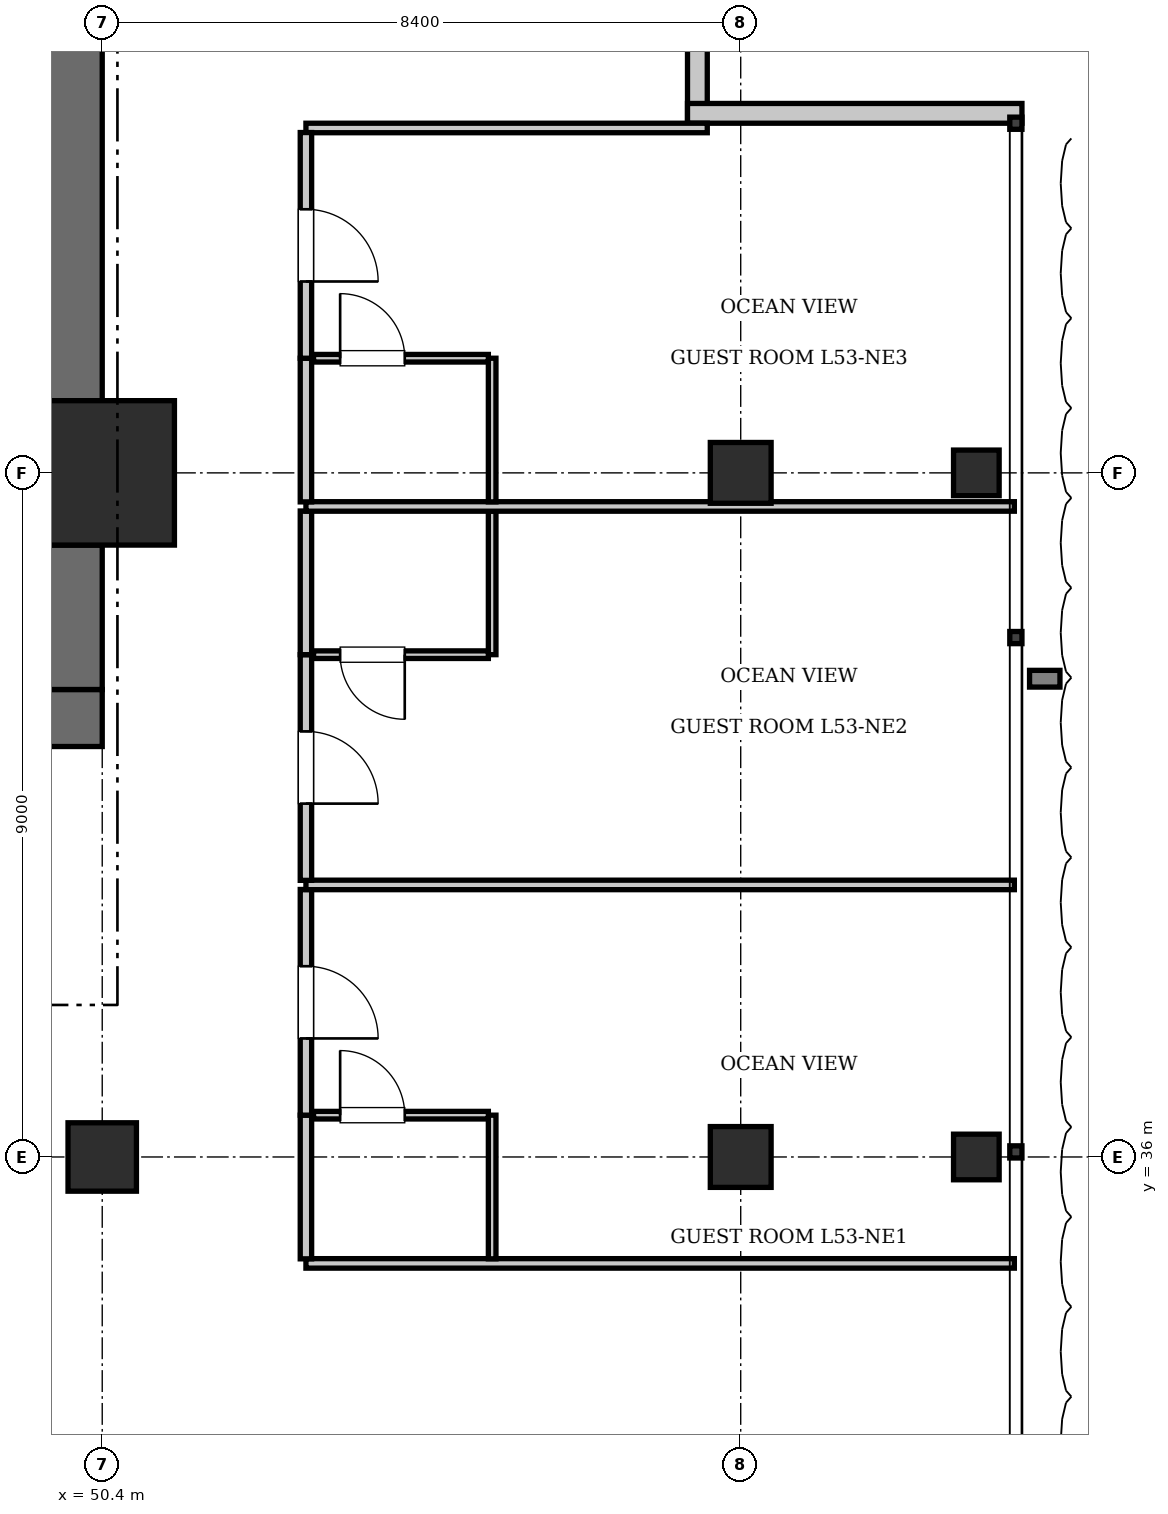
"""IFC4 building model, lengths in metres.
Left out: names, types, materials, properties, quantities, classifications, styles, units other than length and angle.
Written with IfcOpenShell. Run it as: python <this file> out.ifc"""

import sys

from ifc_helpers import new_model, si_unit, direction, frame, frame_2d, origin, origin_2d, place, context, subcontext, project, spatial, rectangle, i_section, extrude, element, fill, save


model = new_model("IFC4")
c1 = context("Model", 3, precision=1e-05, world=origin(), true_north=direction((0.0, 1.0)))
c2 = subcontext(c1, "Body", "Model", "MODEL_VIEW")
j1 = project(units=[si_unit("LENGTHUNIT", "METRE"), si_unit("PLANEANGLEUNIT", "RADIAN")], contexts=[c1])
p1 = place(None, origin())
s1 = spatial("IfcSite", under=j1, at=p1, CompositionType="ELEMENT")
p2 = place(p1, origin())
s2 = spatial("IfcBuilding", under=s1, at=p2, CompositionType="ELEMENT")
p3 = place(p2, frame((0.0, 0.0, 215.95)))
s3 = spatial("IfcBuildingStorey", under=s2, at=p3, CompositionType="ELEMENT", Elevation=215.95)
p4 = place(p3, frame((50.4, 45.0, 0.0), z_axis=(0.0, 0.0, 1.0), x_axis=(1.0, 0.0, 0.0)))
e1 = element("IfcColumn", 1, at=p4, inside=s3, PredefinedType="COLUMN", context=c2, shape_type="SweptSolid", body=[
    extrude(rectangle(XDim=1.9, YDim=1.9, at=origin_2d()), origin(), (0.0, 0.0, 1.0), 3.85),
])
p5 = place(p3, frame((43.6, 41.775, 0.0), z_axis=(0.0, 0.0, 1.0), x_axis=(1.0, 0.0, 0.0)))
e2 = element("IfcWall", 2, at=p5, inside=s3, PredefinedType="SHEAR", context=c2, shape_type="SweptSolid", body=[
    extrude(rectangle(XDim=6.8, YDim=0.75, at=frame_2d((3.4, 0.0))), origin(), (0.0, 0.0, 1.0), 3.85),
])
p6 = place(p5, frame((3.9, 0.0, 0.0)))
e3 = element("IfcOpeningElement", 3, at=p6, cuts=e2, PredefinedType="OPENING", context=c2, shape_type="SweptSolid", body=[
    extrude(rectangle(XDim=1.15, YDim=2.15, at=frame_2d((0.575, 1.075))), frame((0.0, 0.385, 0.0), z_axis=(0.0, -1.0, 0.0), x_axis=(1.0, 0.0, 0.0)), (0.0, 0.0, 1.0), 0.77),
])
p7 = place(p5, frame((0.55, 0.0, 0.0)))
e4 = element("IfcOpeningElement", 4, at=p7, cuts=e2, PredefinedType="OPENING", context=c2, shape_type="SweptSolid", body=[
    extrude(rectangle(XDim=1.1, YDim=2.2, at=frame_2d((0.55, 1.1))), frame((0.0, 0.385, 0.0), z_axis=(0.0, -1.0, 0.0), x_axis=(1.0, 0.0, 0.0)), (0.0, 0.0, 1.0), 0.77),
])
p8 = place(p3, frame((50.025, 42.15, 0.0), z_axis=(0.0, 0.0, 1.0), x_axis=(0.0, 1.0, 0.0)))
e5 = element("IfcWall", 5, at=p8, inside=s3, PredefinedType="SHEAR", context=c2, shape_type="SweptSolid", body=[
    extrude(rectangle(XDim=1.9, YDim=0.75, at=frame_2d((0.95, 0.0))), origin(), (0.0, 0.0, 1.0), 3.85),
])
p9 = place(p3, frame((50.025, 45.95, 0.0), z_axis=(0.0, 0.0, 1.0), x_axis=(0.0, 1.0, 0.0)))
e6 = element("IfcWall", 6, at=p9, inside=s3, PredefinedType="SHEAR", context=c2, shape_type="SweptSolid", body=[
    extrude(rectangle(XDim=7.3, YDim=0.75, at=frame_2d((3.65, 0.0))), origin(), (0.0, 0.0, 1.0), 3.85),
])
p10 = place(p3, frame((50.4, 36.0, 0.0), z_axis=(0.0, 0.0, 1.0), x_axis=(1.0, 0.0, 0.0)))
e7 = element("IfcColumn", 7, at=p10, inside=s3, PredefinedType="COLUMN", context=c2, shape_type="SweptSolid", body=[
    extrude(rectangle(XDim=0.9, YDim=0.9, at=origin_2d()), origin(), (0.0, 0.0, 1.0), 3.85),
])
for number, where, z_axis, x_axis in (
    (8, (58.8, 36.0, 0.0), (0.0, 0.0, 1.0), (1.0, 0.0, 0.0)),
    (9, (58.8, 45.0, 0.0), (0.0, 0.0, 1.0), (1.0, 0.0, 0.0)),
):
    element("IfcColumn", number, at=place(p3, frame(where, z_axis=z_axis, x_axis=x_axis)), inside=s3, PredefinedType="COLUMN", context=c2, shape_type="SweptSolid", body=[
        extrude(rectangle(XDim=0.8, YDim=0.8, at=origin_2d()), origin(), (0.0, 0.0, 1.0), 3.85),
    ])
for number, where, z_axis, x_axis in (
    (10, (61.9, 36.0, 0.0), (0.0, 0.0, 1.0), (1.0, 0.0, 0.0)),
    (11, (61.9, 45.0, 0.0), (0.0, 0.0, 1.0), (1.0, 0.0, 0.0)),
):
    element("IfcColumn", number, at=place(p3, frame(where, z_axis=z_axis, x_axis=x_axis)), inside=s3, PredefinedType="COLUMN", context=c2, shape_type="SweptSolid", body=[
        extrude(i_section(OverallWidth=0.6, OverallDepth=0.6, WebThickness=0.025, FlangeThickness=0.038, at=origin_2d()), origin(), (0.0, 0.0, 1.0), 3.85),
    ])
for number, where, z_axis, x_axis in (
    (12, (58.23, 54.0, 0.0), (0.0, 0.0, 1.0), (0.0, -1.0, 0.0)),
    (13, (58.1, 49.73, 0.0), (0.0, 0.0, 1.0), (1.0, 0.0, 0.0)),
):
    element("IfcWall", number, at=place(p3, frame(where, z_axis=z_axis, x_axis=x_axis)), inside=s3, PredefinedType="SOLIDWALL", context=c2, shape_type="SweptSolid", body=[
        extrude(rectangle(XDim=4.4, YDim=0.26, at=frame_2d((2.2, 0.0))), origin(), (0.0, 0.0, 1.0), 3.61),
    ])
p11 = place(p3, frame((53.08, 34.6, 0.0), z_axis=(0.0, 0.0, 1.0), x_axis=(1.0, 0.0, 0.0)))
e14 = element("IfcWall", 14, at=p11, inside=s3, PredefinedType="PARTITIONING", context=c2, shape_type="SweptSolid", body=[
    extrude(rectangle(XDim=9.32, YDim=0.125, at=frame_2d((4.66, 0.0))), origin(), (0.0, 0.0, 1.0), 3.61),
])
p12 = place(p3, frame((53.08, 49.538, 0.0), z_axis=(0.0, 0.0, 1.0), x_axis=(1.0, 0.0, 0.0)))
e15 = element("IfcWall", 15, at=p12, inside=s3, PredefinedType="PARTITIONING", context=c2, shape_type="SweptSolid", body=[
    extrude(rectangle(XDim=5.28, YDim=0.125, at=frame_2d((2.64, 0.0))), origin(), (0.0, 0.0, 1.0), 3.61),
])
p13 = place(p3, frame((53.08, 34.66, 0.0), z_axis=(0.0, 0.0, 1.0), x_axis=(0.0, 1.0, 0.0)))
e16 = element("IfcWall", 16, at=p13, inside=s3, PredefinedType="PARTITIONING", context=c2, shape_type="SweptSolid", body=[
    extrude(rectangle(XDim=1.89, YDim=0.15, at=frame_2d((0.945, 0.0))), origin(), (0.0, 0.0, 1.0), 3.61),
])
p14 = place(p3, frame((53.08, 36.55, 0.0), z_axis=(0.0, 0.0, 1.0), x_axis=(0.0, 1.0, 0.0)))
e17 = element("IfcWall", 17, at=p14, inside=s3, PredefinedType="PARTITIONING", context=c2, shape_type="SweptSolid", body=[
    extrude(rectangle(XDim=2.969, YDim=0.15, at=frame_2d((1.485, 0.0))), origin(), (0.0, 0.0, 1.0), 3.61),
])
p15 = place(p14, frame((1.01, 0.0, 0.0)))
e18 = element("IfcOpeningElement", 18, at=p15, cuts=e17, PredefinedType="OPENING", context=c2, shape_type="SweptSolid", body=[
    extrude(rectangle(XDim=0.95, YDim=2.15, at=frame_2d((0.475, 1.075))), frame((0.0, 0.085, 0.0), z_axis=(0.0, -1.0, 0.0), x_axis=(1.0, 0.0, 0.0)), (0.0, 0.0, 1.0), 0.17),
])
p16 = place(p3, frame((55.53, 34.66, 0.0), z_axis=(0.0, 0.0, 1.0), x_axis=(0.0, 1.0, 0.0)))
e19 = element("IfcWall", 19, at=p16, inside=s3, PredefinedType="PARTITIONING", context=c2, shape_type="SweptSolid", body=[
    extrude(rectangle(XDim=1.89, YDim=0.1, at=frame_2d((0.945, 0.0))), origin(), (0.0, 0.0, 1.0), 3.61),
])
p17 = place(p3, frame((53.18, 36.55, 0.0), z_axis=(0.0, 0.0, 1.0), x_axis=(1.0, 0.0, 0.0)))
e20 = element("IfcWall", 20, at=p17, inside=s3, PredefinedType="PARTITIONING", context=c2, shape_type="SweptSolid", body=[
    extrude(rectangle(XDim=2.3, YDim=0.1, at=frame_2d((1.15, 0.0))), origin(), (0.0, 0.0, 1.0), 3.61),
])
p18 = place(p17, frame((0.35, 0.0, 0.0)))
e21 = element("IfcOpeningElement", 21, at=p18, cuts=e20, PredefinedType="OPENING", context=c2, shape_type="SweptSolid", body=[
    extrude(rectangle(XDim=0.85, YDim=2.1, at=frame_2d((0.425, 1.05))), frame((0.0, 0.06, 0.0), z_axis=(0.0, -1.0, 0.0), x_axis=(1.0, 0.0, 0.0)), (0.0, 0.0, 1.0), 0.12),
])
p19 = place(p3, frame((53.08, 39.579, 0.0), z_axis=(0.0, 0.0, 1.0), x_axis=(1.0, 0.0, 0.0)))
e22 = element("IfcWall", 22, at=p19, inside=s3, PredefinedType="PARTITIONING", context=c2, shape_type="SweptSolid", body=[
    extrude(rectangle(XDim=9.32, YDim=0.125, at=frame_2d((4.66, 0.0))), origin(), (0.0, 0.0, 1.0), 3.61),
])
p20 = place(p3, frame((53.08, 39.639, 0.0), z_axis=(0.0, 0.0, 1.0), x_axis=(0.0, 1.0, 0.0)))
e23 = element("IfcWall", 23, at=p20, inside=s3, PredefinedType="PARTITIONING", context=c2, shape_type="SweptSolid", body=[
    extrude(rectangle(XDim=2.969, YDim=0.15, at=frame_2d((1.485, 0.0))), origin(), (0.0, 0.0, 1.0), 3.61),
])
p21 = place(p20, frame((1.01, 0.0, 0.0)))
e24 = element("IfcOpeningElement", 24, at=p21, cuts=e23, PredefinedType="OPENING", context=c2, shape_type="SweptSolid", body=[
    extrude(rectangle(XDim=0.95, YDim=2.15, at=frame_2d((0.475, 1.075))), frame((0.0, 0.085, 0.0), z_axis=(0.0, -1.0, 0.0), x_axis=(1.0, 0.0, 0.0)), (0.0, 0.0, 1.0), 0.17),
])
p22 = place(p3, frame((53.08, 42.608, 0.0), z_axis=(0.0, 0.0, 1.0), x_axis=(0.0, 1.0, 0.0)))
e25 = element("IfcWall", 25, at=p22, inside=s3, PredefinedType="PARTITIONING", context=c2, shape_type="SweptSolid", body=[
    extrude(rectangle(XDim=1.89, YDim=0.15, at=frame_2d((0.945, 0.0))), origin(), (0.0, 0.0, 1.0), 3.61),
])
p23 = place(p3, frame((55.53, 42.608, 0.0), z_axis=(0.0, 0.0, 1.0), x_axis=(0.0, 1.0, 0.0)))
e26 = element("IfcWall", 26, at=p23, inside=s3, PredefinedType="PARTITIONING", context=c2, shape_type="SweptSolid", body=[
    extrude(rectangle(XDim=1.89, YDim=0.1, at=frame_2d((0.945, 0.0))), origin(), (0.0, 0.0, 1.0), 3.61),
])
p24 = place(p3, frame((53.18, 42.608, 0.0), z_axis=(0.0, 0.0, 1.0), x_axis=(1.0, 0.0, 0.0)))
e27 = element("IfcWall", 27, at=p24, inside=s3, PredefinedType="PARTITIONING", context=c2, shape_type="SweptSolid", body=[
    extrude(rectangle(XDim=2.3, YDim=0.1, at=frame_2d((1.15, 0.0))), origin(), (0.0, 0.0, 1.0), 3.61),
])
p25 = place(p24, frame((0.35, 0.0, 0.0)))
e28 = element("IfcOpeningElement", 28, at=p25, cuts=e27, PredefinedType="OPENING", context=c2, shape_type="SweptSolid", body=[
    extrude(rectangle(XDim=0.85, YDim=2.1, at=frame_2d((0.425, 1.05))), frame((0.0, 0.06, 0.0), z_axis=(0.0, -1.0, 0.0), x_axis=(1.0, 0.0, 0.0)), (0.0, 0.0, 1.0), 0.12),
])
p26 = place(p3, frame((53.08, 44.558, 0.0), z_axis=(0.0, 0.0, 1.0), x_axis=(1.0, 0.0, 0.0)))
e29 = element("IfcWall", 29, at=p26, inside=s3, PredefinedType="PARTITIONING", context=c2, shape_type="SweptSolid", body=[
    extrude(rectangle(XDim=9.32, YDim=0.125, at=frame_2d((4.66, 0.0))), origin(), (0.0, 0.0, 1.0), 3.61),
])
p27 = place(p3, frame((53.08, 44.618, 0.0), z_axis=(0.0, 0.0, 1.0), x_axis=(0.0, 1.0, 0.0)))
e30 = element("IfcWall", 30, at=p27, inside=s3, PredefinedType="PARTITIONING", context=c2, shape_type="SweptSolid", body=[
    extrude(rectangle(XDim=1.89, YDim=0.15, at=frame_2d((0.945, 0.0))), origin(), (0.0, 0.0, 1.0), 3.61),
])
p28 = place(p3, frame((53.08, 46.508, 0.0), z_axis=(0.0, 0.0, 1.0), x_axis=(0.0, 1.0, 0.0)))
e31 = element("IfcWall", 31, at=p28, inside=s3, PredefinedType="PARTITIONING", context=c2, shape_type="SweptSolid", body=[
    extrude(rectangle(XDim=2.969, YDim=0.15, at=frame_2d((1.485, 0.0))), origin(), (0.0, 0.0, 1.0), 3.61),
])
p29 = place(p28, frame((1.01, 0.0, 0.0)))
e32 = element("IfcOpeningElement", 32, at=p29, cuts=e31, PredefinedType="OPENING", context=c2, shape_type="SweptSolid", body=[
    extrude(rectangle(XDim=0.95, YDim=2.15, at=frame_2d((0.475, 1.075))), frame((0.0, 0.085, 0.0), z_axis=(0.0, -1.0, 0.0), x_axis=(1.0, 0.0, 0.0)), (0.0, 0.0, 1.0), 0.17),
])
p30 = place(p3, frame((55.53, 44.618, 0.0), z_axis=(0.0, 0.0, 1.0), x_axis=(0.0, 1.0, 0.0)))
e33 = element("IfcWall", 33, at=p30, inside=s3, PredefinedType="PARTITIONING", context=c2, shape_type="SweptSolid", body=[
    extrude(rectangle(XDim=1.89, YDim=0.1, at=frame_2d((0.945, 0.0))), origin(), (0.0, 0.0, 1.0), 3.61),
])
p31 = place(p3, frame((53.18, 46.508, 0.0), z_axis=(0.0, 0.0, 1.0), x_axis=(1.0, 0.0, 0.0)))
e34 = element("IfcWall", 34, at=p31, inside=s3, PredefinedType="PARTITIONING", context=c2, shape_type="SweptSolid", body=[
    extrude(rectangle(XDim=2.3, YDim=0.1, at=frame_2d((1.15, 0.0))), origin(), (0.0, 0.0, 1.0), 3.61),
])
p32 = place(p31, frame((0.35, 0.0, 0.0)))
e35 = element("IfcOpeningElement", 35, at=p32, cuts=e34, PredefinedType="OPENING", context=c2, shape_type="SweptSolid", body=[
    extrude(rectangle(XDim=0.85, YDim=2.1, at=frame_2d((0.425, 1.05))), frame((0.0, 0.06, 0.0), z_axis=(0.0, -1.0, 0.0), x_axis=(1.0, 0.0, 0.0)), (0.0, 0.0, 1.0), 0.12),
])
p33 = place(p18, origin())
e36 = element("IfcDoor", 36, at=p33, inside=s3, OperationType="SINGLE_SWING_LEFT", PredefinedType="DOOR", context=c2, shape_type="SweptSolid", body=[
    extrude(rectangle(XDim=0.85, YDim=2.1, at=frame_2d((0.425, 1.05))), frame((0.0, 0.025, 0.0), z_axis=(0.0, -1.0, 0.0), x_axis=(1.0, 0.0, 0.0)), (0.0, 0.0, 1.0), 0.05),
])
fill(e21, e36)
p34 = place(p15, frame((0.95, 0.0, 0.0), z_axis=(0.0, 0.0, 1.0), x_axis=(-1.0, 0.0, 0.0)))
e37 = element("IfcDoor", 37, at=p34, inside=s3, OperationType="SINGLE_SWING_RIGHT", PredefinedType="DOOR", context=c2, shape_type="SweptSolid", body=[
    extrude(rectangle(XDim=0.95, YDim=2.15, at=frame_2d((0.475, 1.075))), frame((0.0, 0.025, 0.0), z_axis=(0.0, -1.0, 0.0), x_axis=(1.0, 0.0, 0.0)), (0.0, 0.0, 1.0), 0.05),
])
fill(e18, e37)
p35 = place(p25, frame((0.85, 0.0, 0.0), z_axis=(0.0, 0.0, 1.0), x_axis=(-1.0, 0.0, 0.0)))
e38 = element("IfcDoor", 38, at=p35, inside=s3, OperationType="SINGLE_SWING_LEFT", PredefinedType="DOOR", context=c2, shape_type="SweptSolid", body=[
    extrude(rectangle(XDim=0.85, YDim=2.1, at=frame_2d((0.425, 1.05))), frame((0.0, 0.025, 0.0), z_axis=(0.0, -1.0, 0.0), x_axis=(1.0, 0.0, 0.0)), (0.0, 0.0, 1.0), 0.05),
])
fill(e28, e38)
p36 = place(p21, frame((0.95, 0.0, 0.0), z_axis=(0.0, 0.0, 1.0), x_axis=(-1.0, 0.0, 0.0)))
e39 = element("IfcDoor", 39, at=p36, inside=s3, OperationType="SINGLE_SWING_RIGHT", PredefinedType="DOOR", context=c2, shape_type="SweptSolid", body=[
    extrude(rectangle(XDim=0.95, YDim=2.15, at=frame_2d((0.475, 1.075))), frame((0.0, 0.025, 0.0), z_axis=(0.0, -1.0, 0.0), x_axis=(1.0, 0.0, 0.0)), (0.0, 0.0, 1.0), 0.05),
])
fill(e24, e39)
p37 = place(p32, origin())
e40 = element("IfcDoor", 40, at=p37, inside=s3, OperationType="SINGLE_SWING_LEFT", PredefinedType="DOOR", context=c2, shape_type="SweptSolid", body=[
    extrude(rectangle(XDim=0.85, YDim=2.1, at=frame_2d((0.425, 1.05))), frame((0.0, 0.025, 0.0), z_axis=(0.0, -1.0, 0.0), x_axis=(1.0, 0.0, 0.0)), (0.0, 0.0, 1.0), 0.05),
])
fill(e35, e40)
p38 = place(p29, frame((0.95, 0.0, 0.0), z_axis=(0.0, 0.0, 1.0), x_axis=(-1.0, 0.0, 0.0)))
e41 = element("IfcDoor", 41, at=p38, inside=s3, OperationType="SINGLE_SWING_RIGHT", PredefinedType="DOOR", context=c2, shape_type="SweptSolid", body=[
    extrude(rectangle(XDim=0.95, YDim=2.15, at=frame_2d((0.475, 1.075))), frame((0.0, 0.025, 0.0), z_axis=(0.0, -1.0, 0.0), x_axis=(1.0, 0.0, 0.0)), (0.0, 0.0, 1.0), 0.05),
])
fill(e32, e41)
save(model, sys.argv[1])
